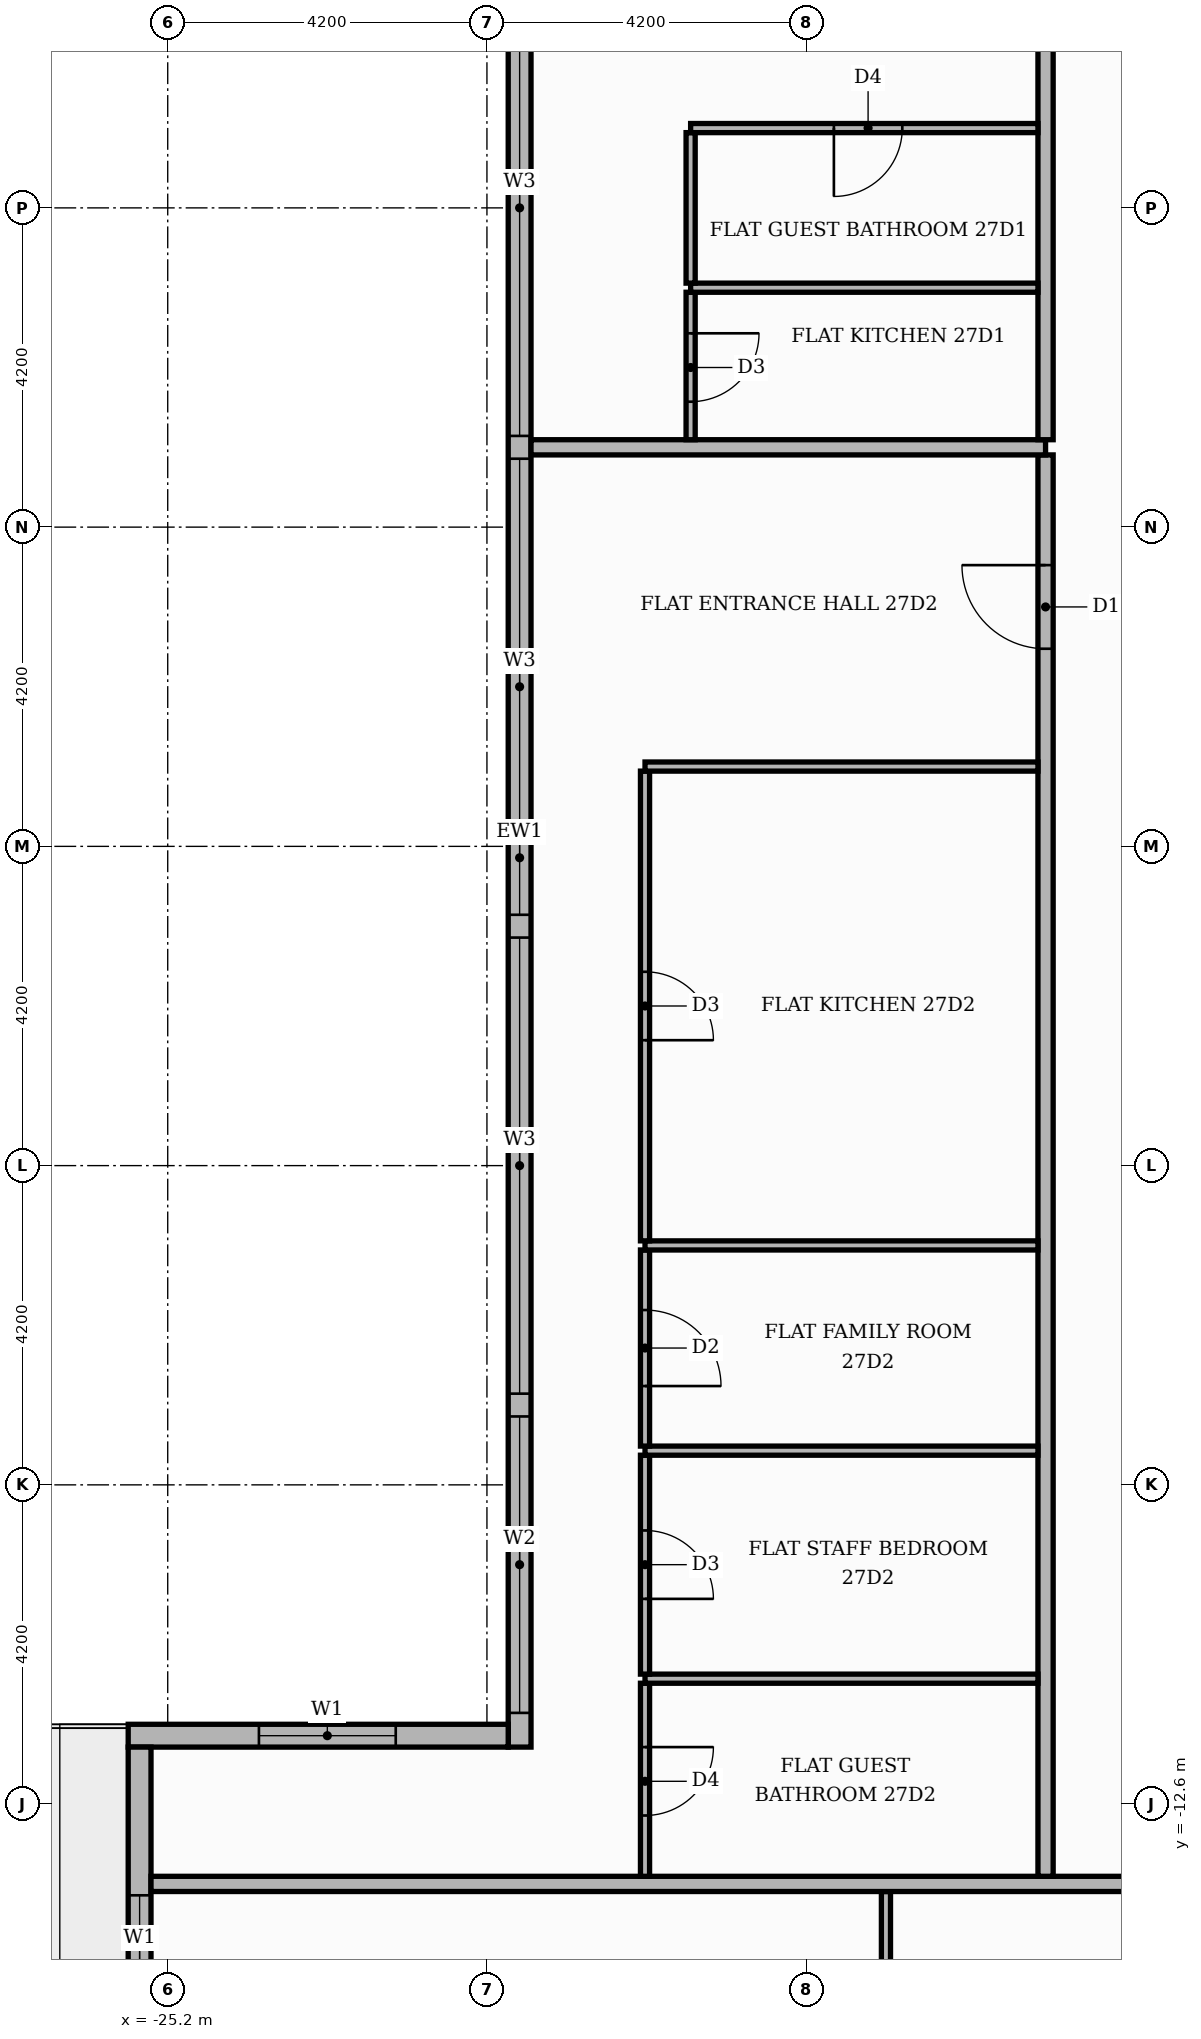
"""IFC4 building model, lengths in metres.
Left out: names, types, materials, properties, quantities, classifications, styles, units other than length and angle.
Written with IfcOpenShell. Run it as: python <this file> out.ifc"""

import sys

from ifc_helpers import new_model, si_unit, direction, frame, frame_2d, origin, place, context, subcontext, project, spatial, rectangle, extrude, element, fill, save


model = new_model("IFC4")
c1 = context("Model", 3, precision=1e-05, world=origin(), true_north=direction((0.0, 1.0)))
c2 = subcontext(c1, "Body", "Model", "MODEL_VIEW")
j1 = project(units=[si_unit("LENGTHUNIT", "METRE"), si_unit("PLANEANGLEUNIT", "RADIAN")], contexts=[c1])
p1 = place(None, origin())
s1 = spatial("IfcSite", under=j1, at=p1, CompositionType="ELEMENT")
p2 = place(p1, origin())
s2 = spatial("IfcBuilding", under=s1, at=p2, CompositionType="ELEMENT")
p3 = place(p2, frame((0.0, 0.0, 114.3)))
s3 = spatial("IfcBuildingStorey", under=s2, at=p3, CompositionType="ELEMENT", Elevation=114.3)
p4 = place(p3, frame((-20.57, 11.55, 0.0), z_axis=(0.0, 0.0, 1.0), x_axis=(0.0, -1.0, 0.0)))
e1 = element("IfcWall", 1, at=p4, inside=s3, PredefinedType="STANDARD", context=c2, shape_type="SweptSolid", body=[
    extrude(rectangle(XDim=23.4, YDim=0.3, at=frame_2d((11.7, 0.0))), origin(), (0.0, 0.0, 1.0), 3.48),
])
p5 = place(p4, frame((0.15, 0.0, 0.9)))
e2 = element("IfcOpeningElement", 2, at=p5, cuts=e1, PredefinedType="OPENING", context=c2, shape_type="SweptSolid", body=[
    extrude(rectangle(XDim=6.0, YDim=2.1, at=frame_2d((3.0, 1.05))), frame((0.0, 0.16, 0.0), z_axis=(0.0, -1.0, 0.0), x_axis=(1.0, 0.0, 0.0)), (0.0, 0.0, 1.0), 0.32),
])
p6 = place(p4, frame((6.45, 0.0, 0.9)))
e3 = element("IfcOpeningElement", 3, at=p6, cuts=e1, PredefinedType="OPENING", context=c2, shape_type="SweptSolid", body=[
    extrude(rectangle(XDim=6.0, YDim=2.1, at=frame_2d((3.0, 1.05))), frame((0.0, 0.16, 0.0), z_axis=(0.0, -1.0, 0.0), x_axis=(1.0, 0.0, 0.0)), (0.0, 0.0, 1.0), 0.32),
])
p7 = place(p4, frame((12.75, 0.0, 0.9)))
e4 = element("IfcOpeningElement", 4, at=p7, cuts=e1, PredefinedType="OPENING", context=c2, shape_type="SweptSolid", body=[
    extrude(rectangle(XDim=6.0, YDim=2.1, at=frame_2d((3.0, 1.05))), frame((0.0, 0.16, 0.0), z_axis=(0.0, -1.0, 0.0), x_axis=(1.0, 0.0, 0.0)), (0.0, 0.0, 1.0), 0.32),
])
p8 = place(p4, frame((19.05, 0.0, 0.9)))
e5 = element("IfcOpeningElement", 5, at=p8, cuts=e1, PredefinedType="OPENING", context=c2, shape_type="SweptSolid", body=[
    extrude(rectangle(XDim=3.9, YDim=2.1, at=frame_2d((1.95, 1.05))), frame((0.0, 0.16, 0.0), z_axis=(0.0, -1.0, 0.0), x_axis=(1.0, 0.0, 0.0)), (0.0, 0.0, 1.0), 0.32),
])
p9 = place(p3, frame((-20.72, -11.7, 0.0), z_axis=(0.0, 0.0, 1.0), x_axis=(-1.0, 0.0, 0.0)))
e6 = element("IfcWall", 6, at=p9, inside=s3, PredefinedType="STANDARD", context=c2, shape_type="SweptSolid", body=[
    extrude(rectangle(XDim=5.0, YDim=0.3, at=frame_2d((2.5, 0.0))), origin(), (0.0, 0.0, 1.0), 3.48),
])
p10 = place(p9, frame((1.48, 0.0, 0.9)))
e7 = element("IfcOpeningElement", 7, at=p10, cuts=e6, PredefinedType="OPENING", context=c2, shape_type="SweptSolid", body=[
    extrude(rectangle(XDim=1.8, YDim=2.1, at=frame_2d((0.9, 1.05))), frame((0.0, 0.16, 0.0), z_axis=(0.0, -1.0, 0.0), x_axis=(1.0, 0.0, 0.0)), (0.0, 0.0, 1.0), 0.32),
])
p11 = place(p3, frame((-25.57, -11.85, 0.0), z_axis=(0.0, 0.0, 1.0), x_axis=(0.0, -1.0, 0.0)))
e8 = element("IfcWall", 8, at=p11, inside=s3, PredefinedType="STANDARD", context=c2, shape_type="SweptSolid", body=[
    extrude(rectangle(XDim=4.35, YDim=0.3, at=frame_2d((2.175, 0.0))), origin(), (0.0, 0.0, 1.0), 3.48),
])
p12 = place(p11, frame((1.95, 0.0, 0.9)))
e9 = element("IfcOpeningElement", 9, at=p12, cuts=e8, PredefinedType="OPENING", context=c2, shape_type="SweptSolid", body=[
    extrude(rectangle(XDim=1.8, YDim=2.1, at=frame_2d((0.9, 1.05))), frame((0.0, 0.16, 0.0), z_axis=(0.0, -1.0, 0.0), x_axis=(1.0, 0.0, 0.0)), (0.0, 0.0, 1.0), 0.32),
])
p13 = place(p3, frame((-15.75, -20.66, 0.0), z_axis=(0.0, 0.0, 1.0), x_axis=(0.0, 1.0, 0.0)))
e10 = element("IfcWall", 10, at=p13, inside=s3, PredefinedType="PARTITIONING", context=c2, shape_type="SweptSolid", body=[
    extrude(rectangle(XDim=6.91, YDim=0.12, at=frame_2d((3.455, 0.0))), origin(), (0.0, 0.0, 1.0), 3.48),
])
p14 = place(p13, frame((3.025, 0.0, 0.0)))
e11 = element("IfcOpeningElement", 11, at=p14, cuts=e10, PredefinedType="OPENING", context=c2, shape_type="SweptSolid", body=[
    extrude(rectangle(XDim=0.9, YDim=2.1, at=frame_2d((0.45, 1.05))), frame((0.0, 0.07, 0.0), z_axis=(0.0, -1.0, 0.0), x_axis=(1.0, 0.0, 0.0)), (0.0, 0.0, 1.0), 0.14),
])
p15 = place(p3, frame((-25.42, -13.65, 0.0), z_axis=(0.0, 0.0, 1.0), x_axis=(1.0, 0.0, 0.0)))
e12 = element("IfcWall", 12, at=p15, inside=s3, PredefinedType="PARTITIONING", context=c2, shape_type="SweptSolid", body=[
    extrude(rectangle(XDim=39.07, YDim=0.2, at=frame_2d((19.535, 0.0))), origin(), (0.0, 0.0, 1.0), 3.48),
])
p16 = place(p15, frame((13.32, 0.0, 0.0)))
e13 = element("IfcOpeningElement", 13, at=p16, cuts=e12, PredefinedType="OPENING", context=c2, shape_type="SweptSolid", body=[
    extrude(rectangle(XDim=1.1, YDim=2.4, at=frame_2d((0.55, 1.2))), frame((0.0, 0.11, 0.0), z_axis=(0.0, -1.0, 0.0), x_axis=(1.0, 0.0, 0.0)), (0.0, 0.0, 1.0), 0.22),
])
p17 = place(p3, frame((-18.92, -13.55, 0.0), z_axis=(0.0, 0.0, 1.0), x_axis=(0.0, 1.0, 0.0)))
e14 = element("IfcWall", 14, at=p17, inside=s3, PredefinedType="PARTITIONING", context=c2, shape_type="SweptSolid", body=[
    extrude(rectangle(XDim=2.54, YDim=0.12, at=frame_2d((1.27, 0.0))), origin(), (0.0, 0.0, 1.0), 3.48),
])
p18 = place(p17, frame((0.8, 0.0, 0.0)))
e15 = element("IfcOpeningElement", 15, at=p18, cuts=e14, PredefinedType="OPENING", context=c2, shape_type="SweptSolid", body=[
    extrude(rectangle(XDim=0.9, YDim=2.1, at=frame_2d((0.45, 1.05))), frame((0.0, 0.07, 0.0), z_axis=(0.0, -1.0, 0.0), x_axis=(1.0, 0.0, 0.0)), (0.0, 0.0, 1.0), 0.14),
])
p19 = place(p3, frame((-13.65, -13.55, 0.0), z_axis=(0.0, 0.0, 1.0), x_axis=(0.0, 1.0, 0.0)))
e16 = element("IfcWall", 16, at=p19, inside=s3, PredefinedType="PARTITIONING", context=c2, shape_type="SweptSolid", body=[
    extrude(rectangle(XDim=18.7, YDim=0.2, at=frame_2d((9.35, 0.0))), origin(), (0.0, 0.0, 1.0), 3.48),
])
p20 = place(p19, frame((16.15, 0.0, 0.0)))
e17 = element("IfcOpeningElement", 17, at=p20, cuts=e16, PredefinedType="OPENING", context=c2, shape_type="SweptSolid", body=[
    extrude(rectangle(XDim=1.1, YDim=2.4, at=frame_2d((0.55, 1.2))), frame((0.0, 0.11, 0.0), z_axis=(0.0, -1.0, 0.0), x_axis=(1.0, 0.0, 0.0)), (0.0, 0.0, 1.0), 0.22),
])
p21 = place(p3, frame((-18.92, -10.95, 0.0), z_axis=(0.0, 0.0, 1.0), x_axis=(1.0, 0.0, 0.0)))
e18 = element("IfcWall", 18, at=p21, inside=s3, PredefinedType="PARTITIONING", context=c2, shape_type="SweptSolid", body=[
    extrude(rectangle(XDim=5.17, YDim=0.12, at=frame_2d((2.585, 0.0))), origin(), (0.0, 0.0, 1.0), 3.48),
])
p22 = place(p3, frame((-18.92, -10.89, 0.0), z_axis=(0.0, 0.0, 1.0), x_axis=(0.0, 1.0, 0.0)))
e19 = element("IfcWall", 19, at=p22, inside=s3, PredefinedType="PARTITIONING", context=c2, shape_type="SweptSolid", body=[
    extrude(rectangle(XDim=2.88, YDim=0.12, at=frame_2d((1.44, 0.0))), origin(), (0.0, 0.0, 1.0), 3.48),
])
p23 = place(p22, frame((0.99, 0.0, 0.0)))
e20 = element("IfcOpeningElement", 20, at=p23, cuts=e19, PredefinedType="OPENING", context=c2, shape_type="SweptSolid", body=[
    extrude(rectangle(XDim=0.9, YDim=2.1, at=frame_2d((0.45, 1.05))), frame((0.0, 0.07, 0.0), z_axis=(0.0, -1.0, 0.0), x_axis=(1.0, 0.0, 0.0)), (0.0, 0.0, 1.0), 0.14),
])
p24 = place(p3, frame((-18.92, -7.95, 0.0), z_axis=(0.0, 0.0, 1.0), x_axis=(1.0, 0.0, 0.0)))
e21 = element("IfcWall", 21, at=p24, inside=s3, PredefinedType="PARTITIONING", context=c2, shape_type="SweptSolid", body=[
    extrude(rectangle(XDim=5.17, YDim=0.12, at=frame_2d((2.585, 0.0))), origin(), (0.0, 0.0, 1.0), 3.48),
])
p25 = place(p3, frame((-18.92, -7.89, 0.0), z_axis=(0.0, 0.0, 1.0), x_axis=(0.0, 1.0, 0.0)))
e22 = element("IfcWall", 22, at=p25, inside=s3, PredefinedType="PARTITIONING", context=c2, shape_type="SweptSolid", body=[
    extrude(rectangle(XDim=2.58, YDim=0.12, at=frame_2d((1.29, 0.0))), origin(), (0.0, 0.0, 1.0), 3.48),
])
p26 = place(p25, frame((0.79, 0.0, 0.0)))
e23 = element("IfcOpeningElement", 23, at=p26, cuts=e22, PredefinedType="OPENING", context=c2, shape_type="SweptSolid", body=[
    extrude(rectangle(XDim=1.0, YDim=2.1, at=frame_2d((0.5, 1.05))), frame((0.0, 0.07, 0.0), z_axis=(0.0, -1.0, 0.0), x_axis=(1.0, 0.0, 0.0)), (0.0, 0.0, 1.0), 0.14),
])
p27 = place(p3, frame((-18.92, -5.25, 0.0), z_axis=(0.0, 0.0, 1.0), x_axis=(1.0, 0.0, 0.0)))
e24 = element("IfcWall", 24, at=p27, inside=s3, PredefinedType="PARTITIONING", context=c2, shape_type="SweptSolid", body=[
    extrude(rectangle(XDim=5.17, YDim=0.12, at=frame_2d((2.585, 0.0))), origin(), (0.0, 0.0, 1.0), 3.48),
])
p28 = place(p3, frame((-18.92, -5.19, 0.0), z_axis=(0.0, 0.0, 1.0), x_axis=(0.0, 1.0, 0.0)))
e25 = element("IfcWall", 25, at=p28, inside=s3, PredefinedType="PARTITIONING", context=c2, shape_type="SweptSolid", body=[
    extrude(rectangle(XDim=6.18, YDim=0.12, at=frame_2d((3.09, 0.0))), origin(), (0.0, 0.0, 1.0), 3.48),
])
p29 = place(p28, frame((2.64, 0.0, 0.0)))
e26 = element("IfcOpeningElement", 26, at=p29, cuts=e25, PredefinedType="OPENING", context=c2, shape_type="SweptSolid", body=[
    extrude(rectangle(XDim=0.9, YDim=2.1, at=frame_2d((0.45, 1.05))), frame((0.0, 0.07, 0.0), z_axis=(0.0, -1.0, 0.0), x_axis=(1.0, 0.0, 0.0)), (0.0, 0.0, 1.0), 0.14),
])
p30 = place(p3, frame((-18.92, 1.05, 0.0), z_axis=(0.0, 0.0, 1.0), x_axis=(1.0, 0.0, 0.0)))
e27 = element("IfcWall", 27, at=p30, inside=s3, PredefinedType="PARTITIONING", context=c2, shape_type="SweptSolid", body=[
    extrude(rectangle(XDim=5.17, YDim=0.12, at=frame_2d((2.585, 0.0))), origin(), (0.0, 0.0, 1.0), 3.48),
])
p31 = place(p3, frame((-20.42, 5.25, 0.0), z_axis=(0.0, 0.0, 1.0), x_axis=(1.0, 0.0, 0.0)))
e28 = element("IfcWall", 28, at=p31, inside=s3, PredefinedType="PARTITIONING", context=c2, shape_type="SweptSolid", body=[
    extrude(rectangle(XDim=6.77, YDim=0.2, at=frame_2d((3.385, 0.0))), origin(), (0.0, 0.0, 1.0), 3.48),
])
p32 = place(p3, frame((-18.32, 5.35, 0.0), z_axis=(0.0, 0.0, 1.0), x_axis=(0.0, 1.0, 0.0)))
e29 = element("IfcWall", 29, at=p32, inside=s3, PredefinedType="PARTITIONING", context=c2, shape_type="SweptSolid", body=[
    extrude(rectangle(XDim=1.94, YDim=0.12, at=frame_2d((0.97, 0.0))), origin(), (0.0, 0.0, 1.0), 3.48),
])
p33 = place(p32, frame((0.5, 0.0, 0.0)))
e30 = element("IfcOpeningElement", 30, at=p33, cuts=e29, PredefinedType="OPENING", context=c2, shape_type="SweptSolid", body=[
    extrude(rectangle(XDim=0.9, YDim=2.1, at=frame_2d((0.45, 1.05))), frame((0.0, 0.07, 0.0), z_axis=(0.0, -1.0, 0.0), x_axis=(1.0, 0.0, 0.0)), (0.0, 0.0, 1.0), 0.14),
])
p34 = place(p3, frame((-13.65, 5.35, 0.0), z_axis=(0.0, 0.0, 1.0), x_axis=(0.0, 1.0, 0.0)))
e31 = element("IfcWall", 31, at=p34, inside=s3, PredefinedType="PARTITIONING", context=c2, shape_type="SweptSolid", body=[
    extrude(rectangle(XDim=8.2, YDim=0.2, at=frame_2d((4.1, 0.0))), origin(), (0.0, 0.0, 1.0), 3.48),
])
p35 = place(p34, frame((5.65, 0.0, 0.0)))
e32 = element("IfcOpeningElement", 32, at=p35, cuts=e31, PredefinedType="OPENING", context=c2, shape_type="SweptSolid", body=[
    extrude(rectangle(XDim=1.1, YDim=2.4, at=frame_2d((0.55, 1.2))), frame((0.0, 0.11, 0.0), z_axis=(0.0, -1.0, 0.0), x_axis=(1.0, 0.0, 0.0)), (0.0, 0.0, 1.0), 0.22),
])
p36 = place(p3, frame((-18.32, 7.35, 0.0), z_axis=(0.0, 0.0, 1.0), x_axis=(1.0, 0.0, 0.0)))
e33 = element("IfcWall", 33, at=p36, inside=s3, PredefinedType="PARTITIONING", context=c2, shape_type="SweptSolid", body=[
    extrude(rectangle(XDim=4.57, YDim=0.12, at=frame_2d((2.285, 0.0))), origin(), (0.0, 0.0, 1.0), 3.48),
])
p37 = place(p3, frame((-18.32, 7.41, 0.0), z_axis=(0.0, 0.0, 1.0), x_axis=(0.0, 1.0, 0.0)))
e34 = element("IfcWall", 34, at=p37, inside=s3, PredefinedType="PARTITIONING", context=c2, shape_type="SweptSolid", body=[
    extrude(rectangle(XDim=1.98, YDim=0.12, at=frame_2d((0.99, 0.0))), origin(), (0.0, 0.0, 1.0), 3.48),
])
p38 = place(p3, frame((-18.32, 9.45, 0.0), z_axis=(0.0, 0.0, 1.0), x_axis=(1.0, 0.0, 0.0)))
e35 = element("IfcWall", 35, at=p38, inside=s3, PredefinedType="PARTITIONING", context=c2, shape_type="SweptSolid", body=[
    extrude(rectangle(XDim=4.57, YDim=0.12, at=frame_2d((2.285, 0.0))), origin(), (0.0, 0.0, 1.0), 3.48),
])
p39 = place(p38, frame((1.885, 0.0, 0.0)))
e36 = element("IfcOpeningElement", 36, at=p39, cuts=e35, PredefinedType="OPENING", context=c2, shape_type="SweptSolid", body=[
    extrude(rectangle(XDim=0.9, YDim=2.1, at=frame_2d((0.45, 1.05))), frame((0.0, 0.07, 0.0), z_axis=(0.0, -1.0, 0.0), x_axis=(1.0, 0.0, 0.0)), (0.0, 0.0, 1.0), 0.14),
])
p40 = place(p5, origin())
e37 = element("IfcWindow", 37, at=p40, inside=s3, PartitioningType="SINGLE_PANEL", PredefinedType="WINDOW", context=c2, shape_type="SweptSolid", body=[
    extrude(rectangle(XDim=6.0, YDim=2.1, at=frame_2d((3.0, 1.05))), frame((0.0, 0.03, 0.0), z_axis=(0.0, -1.0, 0.0), x_axis=(1.0, 0.0, 0.0)), (0.0, 0.0, 1.0), 0.06),
])
fill(e2, e37)
p41 = place(p6, origin())
e38 = element("IfcWindow", 38, at=p41, inside=s3, PartitioningType="SINGLE_PANEL", PredefinedType="WINDOW", context=c2, shape_type="SweptSolid", body=[
    extrude(rectangle(XDim=6.0, YDim=2.1, at=frame_2d((3.0, 1.05))), frame((0.0, 0.03, 0.0), z_axis=(0.0, -1.0, 0.0), x_axis=(1.0, 0.0, 0.0)), (0.0, 0.0, 1.0), 0.06),
])
fill(e3, e38)
p42 = place(p7, origin())
e39 = element("IfcWindow", 39, at=p42, inside=s3, PartitioningType="SINGLE_PANEL", PredefinedType="WINDOW", context=c2, shape_type="SweptSolid", body=[
    extrude(rectangle(XDim=6.0, YDim=2.1, at=frame_2d((3.0, 1.05))), frame((0.0, 0.03, 0.0), z_axis=(0.0, -1.0, 0.0), x_axis=(1.0, 0.0, 0.0)), (0.0, 0.0, 1.0), 0.06),
])
fill(e4, e39)
p43 = place(p8, origin())
e40 = element("IfcWindow", 40, at=p43, inside=s3, PartitioningType="SINGLE_PANEL", PredefinedType="WINDOW", context=c2, shape_type="SweptSolid", body=[
    extrude(rectangle(XDim=3.9, YDim=2.1, at=frame_2d((1.95, 1.05))), frame((0.0, 0.03, 0.0), z_axis=(0.0, -1.0, 0.0), x_axis=(1.0, 0.0, 0.0)), (0.0, 0.0, 1.0), 0.06),
])
fill(e5, e40)
p44 = place(p10, origin())
e41 = element("IfcWindow", 41, at=p44, inside=s3, PartitioningType="SINGLE_PANEL", PredefinedType="WINDOW", context=c2, shape_type="SweptSolid", body=[
    extrude(rectangle(XDim=1.8, YDim=2.1, at=frame_2d((0.9, 1.05))), frame((0.0, 0.03, 0.0), z_axis=(0.0, -1.0, 0.0), x_axis=(1.0, 0.0, 0.0)), (0.0, 0.0, 1.0), 0.06),
])
fill(e7, e41)
p45 = place(p12, origin())
e42 = element("IfcWindow", 42, at=p45, inside=s3, PartitioningType="SINGLE_PANEL", PredefinedType="WINDOW", context=c2, shape_type="SweptSolid", body=[
    extrude(rectangle(XDim=1.8, YDim=2.1, at=frame_2d((0.9, 1.05))), frame((0.0, 0.03, 0.0), z_axis=(0.0, -1.0, 0.0), x_axis=(1.0, 0.0, 0.0)), (0.0, 0.0, 1.0), 0.06),
])
fill(e9, e42)
p46 = place(p39, frame((0.9, 0.0, 0.0), z_axis=(0.0, 0.0, 1.0), x_axis=(-1.0, 0.0, 0.0)))
e43 = element("IfcDoor", 43, at=p46, inside=s3, OperationType="SINGLE_SWING_LEFT", PredefinedType="DOOR", context=c2, shape_type="SweptSolid", body=[
    extrude(rectangle(XDim=0.9, YDim=2.1, at=frame_2d((0.45, 1.05))), frame((0.0, 0.025, 0.0), z_axis=(0.0, -1.0, 0.0), x_axis=(1.0, 0.0, 0.0)), (0.0, 0.0, 1.0), 0.05),
])
fill(e36, e43)
p47 = place(p33, frame((0.9, 0.0, 0.0), z_axis=(0.0, 0.0, 1.0), x_axis=(-1.0, 0.0, 0.0)))
e44 = element("IfcDoor", 44, at=p47, inside=s3, OperationType="SINGLE_SWING_RIGHT", PredefinedType="DOOR", context=c2, shape_type="SweptSolid", body=[
    extrude(rectangle(XDim=0.9, YDim=2.1, at=frame_2d((0.45, 1.05))), frame((0.0, 0.025, 0.0), z_axis=(0.0, -1.0, 0.0), x_axis=(1.0, 0.0, 0.0)), (0.0, 0.0, 1.0), 0.05),
])
fill(e30, e44)
p48 = place(p20, origin())
e45 = element("IfcDoor", 45, at=p48, inside=s3, OperationType="SINGLE_SWING_RIGHT", PredefinedType="DOOR", context=c2, shape_type="SweptSolid", body=[
    extrude(rectangle(XDim=1.1, YDim=2.4, at=frame_2d((0.55, 1.2))), frame((0.0, 0.025, 0.0), z_axis=(0.0, -1.0, 0.0), x_axis=(1.0, 0.0, 0.0)), (0.0, 0.0, 1.0), 0.05),
])
fill(e17, e45)
p49 = place(p29, frame((0.9, 0.0, 0.0), z_axis=(0.0, 0.0, 1.0), x_axis=(-1.0, 0.0, 0.0)))
e46 = element("IfcDoor", 46, at=p49, inside=s3, OperationType="SINGLE_SWING_LEFT", PredefinedType="DOOR", context=c2, shape_type="SweptSolid", body=[
    extrude(rectangle(XDim=0.9, YDim=2.1, at=frame_2d((0.45, 1.05))), frame((0.0, 0.025, 0.0), z_axis=(0.0, -1.0, 0.0), x_axis=(1.0, 0.0, 0.0)), (0.0, 0.0, 1.0), 0.05),
])
fill(e26, e46)
p50 = place(p26, frame((1.0, 0.0, 0.0), z_axis=(0.0, 0.0, 1.0), x_axis=(-1.0, 0.0, 0.0)))
e47 = element("IfcDoor", 47, at=p50, inside=s3, OperationType="SINGLE_SWING_LEFT", PredefinedType="DOOR", context=c2, shape_type="SweptSolid", body=[
    extrude(rectangle(XDim=1.0, YDim=2.1, at=frame_2d((0.5, 1.05))), frame((0.0, 0.025, 0.0), z_axis=(0.0, -1.0, 0.0), x_axis=(1.0, 0.0, 0.0)), (0.0, 0.0, 1.0), 0.05),
])
fill(e23, e47)
p51 = place(p23, frame((0.9, 0.0, 0.0), z_axis=(0.0, 0.0, 1.0), x_axis=(-1.0, 0.0, 0.0)))
e48 = element("IfcDoor", 48, at=p51, inside=s3, OperationType="SINGLE_SWING_LEFT", PredefinedType="DOOR", context=c2, shape_type="SweptSolid", body=[
    extrude(rectangle(XDim=0.9, YDim=2.1, at=frame_2d((0.45, 1.05))), frame((0.0, 0.025, 0.0), z_axis=(0.0, -1.0, 0.0), x_axis=(1.0, 0.0, 0.0)), (0.0, 0.0, 1.0), 0.05),
])
fill(e20, e48)
p52 = place(p18, frame((0.9, 0.0, 0.0), z_axis=(0.0, 0.0, 1.0), x_axis=(-1.0, 0.0, 0.0)))
e49 = element("IfcDoor", 49, at=p52, inside=s3, OperationType="SINGLE_SWING_RIGHT", PredefinedType="DOOR", context=c2, shape_type="SweptSolid", body=[
    extrude(rectangle(XDim=0.9, YDim=2.1, at=frame_2d((0.45, 1.05))), frame((0.0, 0.025, 0.0), z_axis=(0.0, -1.0, 0.0), x_axis=(1.0, 0.0, 0.0)), (0.0, 0.0, 1.0), 0.05),
])
fill(e15, e49)
save(model, sys.argv[1])
